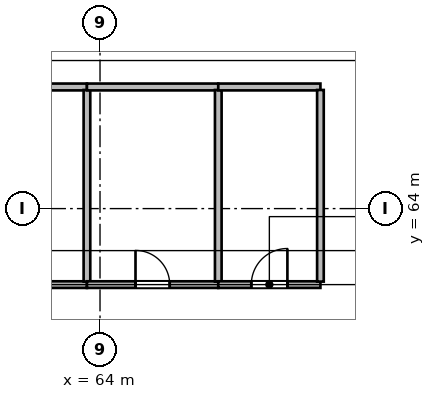
"""IFC4 building model, lengths in metres.
Left out: names, types, materials, properties, quantities, classifications, styles, units other than length and angle.
Written with IfcOpenShell. Run it as: python <this file> out.ifc"""

import sys

from ifc_helpers import new_model, si_unit, direction, frame, frame_2d, origin, place, context, subcontext, project, spatial, rectangle, extrude, source, transform, mapped, element, fill, save


model = new_model("IFC4")
c1 = context("Model", 3, precision=1e-05, world=origin(), true_north=direction((0.0, 1.0)))
c2 = subcontext(c1, "Body", "Model", "MODEL_VIEW")
j1 = project(units=[si_unit("LENGTHUNIT", "METRE"), si_unit("PLANEANGLEUNIT", "RADIAN")], contexts=[c1])
p1 = place(None, origin())
s1 = spatial("IfcSite", under=j1, at=p1, CompositionType="ELEMENT")
p2 = place(p1, origin())
s2 = spatial("IfcBuilding", under=s1, at=p2, CompositionType="ELEMENT")
p3 = place(p2, frame((0.0, 0.0, 12.0)))
s3 = spatial("IfcBuildingStorey", under=s2, at=p3, CompositionType="ELEMENT", Elevation=12.0)
m1 = source(origin(), c2, "Body", "SweptSolid", [
    extrude(rectangle(XDim=3.456, YDim=0.175, at=frame_2d((1.728, 0.0))), origin(), (0.0, 0.0, 1.0), 5.7),
])
p4 = place(p3, frame((60.2, 62.0, 0.0), z_axis=(0.0, 0.0, 1.0), x_axis=(1.0, 0.0, 0.0)))
e1 = element("IfcWall", 1, at=p4, inside=s3, PredefinedType="PARTITIONING", context=c2, shape_type="MappedRepresentation", body=[
    mapped(m1, transform((0.0, 0.0, 0.0), scale=1.0)),
])
p5 = place(p4, frame((1.278, 0.0, 0.0)))
e2 = element("IfcOpeningElement", 2, at=p5, cuts=e1, PredefinedType="OPENING", context=c2, shape_type="SweptSolid", body=[
    extrude(rectangle(XDim=0.9, YDim=2.08, at=frame_2d((0.45, 1.04))), frame((0.0, 0.098, 0.0), z_axis=(0.0, -1.0, 0.0), x_axis=(1.0, 0.0, 0.0)), (0.0, 0.0, 1.0), 0.195),
])
m2 = source(origin(), c2, "Body", "SweptSolid", [
    extrude(rectangle(XDim=3.456, YDim=0.18, at=frame_2d((1.728, 0.0))), origin(), (0.0, 0.0, 1.0), 5.7),
])
p6 = place(p3, frame((60.2, 67.2, 0.0), z_axis=(0.0, 0.0, 1.0), x_axis=(1.0, 0.0, 0.0)))
e3 = element("IfcWall", 3, at=p6, inside=s3, PredefinedType="PLUMBINGWALL", context=c2, shape_type="MappedRepresentation", body=[
    mapped(m2, transform((0.0, 0.0, 0.0), scale=1.0)),
])
m3 = source(origin(), c2, "Body", "SweptSolid", [
    extrude(rectangle(XDim=5.043, YDim=0.175, at=frame_2d((2.521, 0.0))), origin(), (0.0, 0.0, 1.0), 5.7),
])
p7 = place(p3, frame((63.656, 62.079, 0.0), z_axis=(0.0, 0.0, 1.0), x_axis=(0.0, 1.0, 0.0)))
e4 = element("IfcWall", 4, at=p7, inside=s3, PredefinedType="PARTITIONING", context=c2, shape_type="MappedRepresentation", body=[
    mapped(m3, transform((0.0, 0.0, 0.0), scale=1.0)),
])
p8 = place(p3, frame((63.656, 62.0, 0.0), z_axis=(0.0, 0.0, 1.0), x_axis=(1.0, 0.0, 0.0)))
e5 = element("IfcWall", 5, at=p8, inside=s3, PredefinedType="PARTITIONING", context=c2, shape_type="MappedRepresentation", body=[
    mapped(m1, transform((0.0, 0.0, 0.0), scale=1.0)),
])
p9 = place(p8, frame((1.278, 0.0, 0.0)))
e6 = element("IfcOpeningElement", 6, at=p9, cuts=e5, PredefinedType="OPENING", context=c2, shape_type="SweptSolid", body=[
    extrude(rectangle(XDim=0.9, YDim=2.08, at=frame_2d((0.45, 1.04))), frame((0.0, 0.098, 0.0), z_axis=(0.0, -1.0, 0.0), x_axis=(1.0, 0.0, 0.0)), (0.0, 0.0, 1.0), 0.195),
])
p10 = place(p3, frame((63.656, 67.2, 0.0), z_axis=(0.0, 0.0, 1.0), x_axis=(1.0, 0.0, 0.0)))
e7 = element("IfcWall", 7, at=p10, inside=s3, PredefinedType="PLUMBINGWALL", context=c2, shape_type="MappedRepresentation", body=[
    mapped(m2, transform((0.0, 0.0, 0.0), scale=1.0)),
])
p11 = place(p3, frame((67.112, 62.079, 0.0), z_axis=(0.0, 0.0, 1.0), x_axis=(0.0, 1.0, 0.0)))
e8 = element("IfcWall", 8, at=p11, inside=s3, PredefinedType="PARTITIONING", context=c2, shape_type="MappedRepresentation", body=[
    mapped(m3, transform((0.0, 0.0, 0.0), scale=1.0)),
])
m4 = source(origin(), c2, "Body", "SweptSolid", [
    extrude(rectangle(XDim=2.688, YDim=0.175, at=frame_2d((1.344, 0.0))), origin(), (0.0, 0.0, 1.0), 5.7),
])
p12 = place(p3, frame((67.112, 62.0, 0.0), z_axis=(0.0, 0.0, 1.0), x_axis=(1.0, 0.0, 0.0)))
e9 = element("IfcWall", 9, at=p12, inside=s3, PredefinedType="PARTITIONING", context=c2, shape_type="MappedRepresentation", body=[
    mapped(m4, transform((0.0, 0.0, 0.0), scale=1.0)),
])
p13 = place(p12, frame((0.869, 0.0, 0.0)))
e10 = element("IfcOpeningElement", 10, at=p13, cuts=e9, PredefinedType="OPENING", context=c2, shape_type="SweptSolid", body=[
    extrude(rectangle(XDim=0.95, YDim=2.12, at=frame_2d((0.475, 1.06))), frame((0.0, 0.098, 0.0), z_axis=(0.0, -1.0, 0.0), x_axis=(1.0, 0.0, 0.0)), (0.0, 0.0, 1.0), 0.195),
])
m5 = source(origin(), c2, "Body", "SweptSolid", [
    extrude(rectangle(XDim=2.688, YDim=0.18, at=frame_2d((1.344, 0.0))), origin(), (0.0, 0.0, 1.0), 5.7),
])
p14 = place(p3, frame((67.112, 67.2, 0.0), z_axis=(0.0, 0.0, 1.0), x_axis=(1.0, 0.0, 0.0)))
e11 = element("IfcWall", 11, at=p14, inside=s3, PredefinedType="PLUMBINGWALL", context=c2, shape_type="MappedRepresentation", body=[
    mapped(m5, transform((0.0, 0.0, 0.0), scale=1.0)),
])
p15 = place(p3, frame((69.8, 62.079, 0.0), z_axis=(0.0, 0.0, 1.0), x_axis=(0.0, 1.0, 0.0)))
e12 = element("IfcWall", 12, at=p15, inside=s3, PredefinedType="PARTITIONING", context=c2, shape_type="MappedRepresentation", body=[
    mapped(m3, transform((0.0, 0.0, 0.0), scale=1.0)),
])
m6 = source(origin(), c2, "Body", "SweptSolid", [
    extrude(rectangle(XDim=0.9, YDim=2.08, at=frame_2d((0.45, 1.04))), frame((0.0, 0.025, 0.0), z_axis=(0.0, -1.0, 0.0), x_axis=(1.0, 0.0, 0.0)), (0.0, 0.0, 1.0), 0.05),
])
p16 = place(p9, origin())
e13 = element("IfcDoor", 13, at=p16, inside=s3, OperationType="SINGLE_SWING_LEFT", PredefinedType="DOOR", context=c2, shape_type="MappedRepresentation", body=[
    mapped(m6, transform((0.0, 0.0, 0.0), scale=1.0)),
])
fill(e6, e13)
m7 = source(origin(), c2, "Body", "SweptSolid", [
    extrude(rectangle(XDim=0.95, YDim=2.12, at=frame_2d((0.475, 1.06))), frame((0.0, 0.025, 0.0), z_axis=(0.0, -1.0, 0.0), x_axis=(1.0, 0.0, 0.0)), (0.0, 0.0, 1.0), 0.05),
])
p17 = place(p13, origin())
e14 = element("IfcDoor", 14, at=p17, inside=s3, OperationType="SINGLE_SWING_RIGHT", PredefinedType="DOOR", context=c2, shape_type="MappedRepresentation", body=[
    mapped(m7, transform((0.0, 0.0, 0.0), scale=1.0)),
])
fill(e10, e14)
save(model, sys.argv[1])
